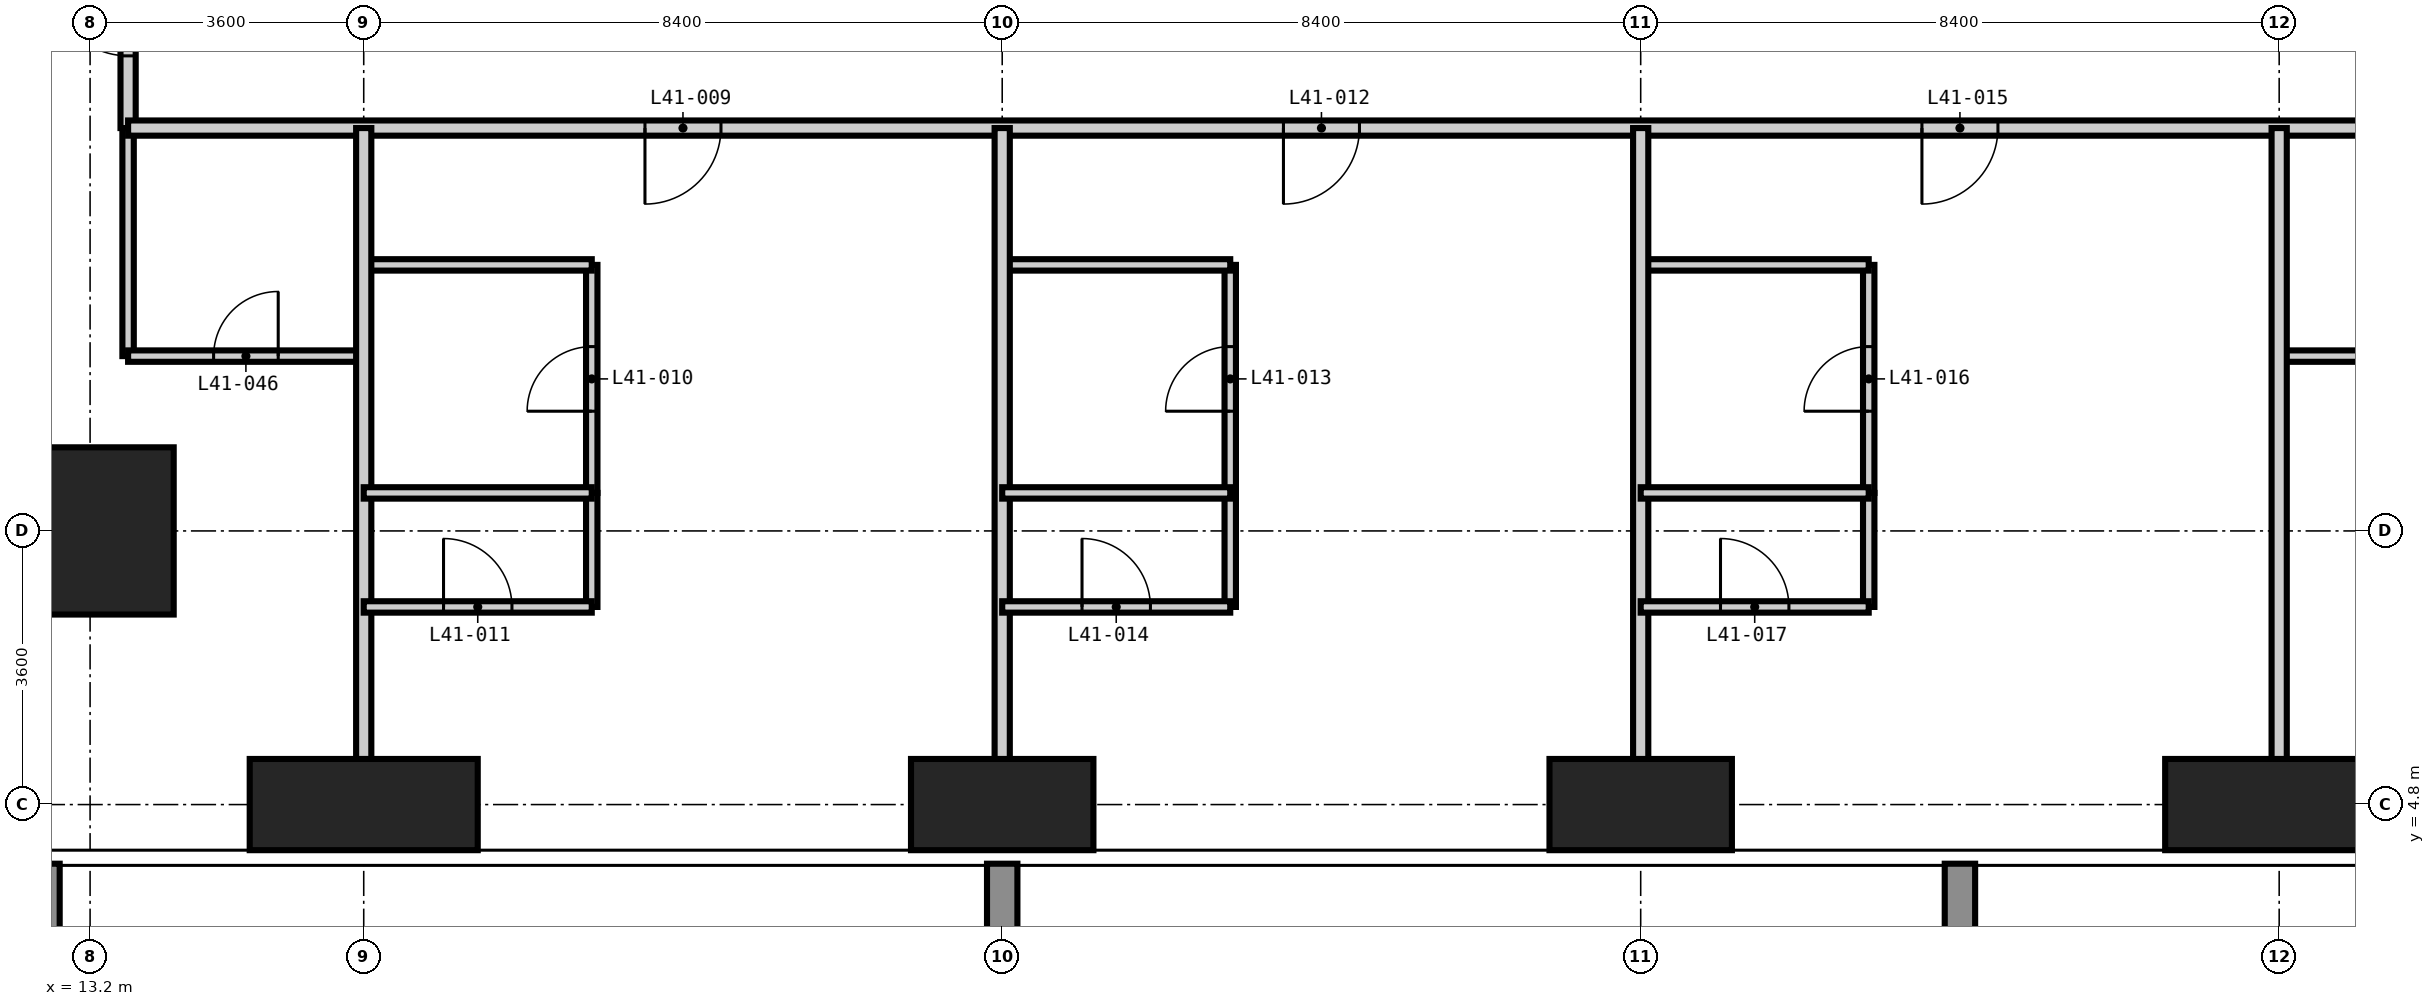
"""IFC4 building model, lengths in metres.
Left out: names, types, materials, properties, quantities, classifications, styles, units other than length and angle.
Written with IfcOpenShell. Run it as: python <this file> out.ifc"""

import sys

from ifc_helpers import new_model, si_unit, direction, frame, frame_2d, origin, origin_2d, place, context, subcontext, project, spatial, rectangle, extrude, element, fill, save


model = new_model("IFC4")
c1 = context("Model", 3, precision=1e-05, world=origin(), true_north=direction((0.0, 1.0)))
c2 = subcontext(c1, "Body", "Model", "MODEL_VIEW")
j1 = project(units=[si_unit("LENGTHUNIT", "METRE"), si_unit("PLANEANGLEUNIT", "RADIAN")], contexts=[c1])
p1 = place(None, origin())
s1 = spatial("IfcSite", under=j1, at=p1, CompositionType="ELEMENT")
p2 = place(p1, origin())
s2 = spatial("IfcBuilding", under=s1, at=p2, CompositionType="ELEMENT")
p3 = place(p2, frame((0.0, 0.0, 162.6)))
s3 = spatial("IfcBuildingStorey", under=s2, at=p3, CompositionType="ELEMENT", Elevation=162.6)
p4 = place(p3, frame((13.2, 8.4, -0.35), z_axis=(0.0, 0.0, 1.0), x_axis=(1.0, 0.0, 0.0)))
e1 = element("IfcColumn", 1, at=p4, inside=s3, PredefinedType="COLUMN", context=c2, shape_type="SweptSolid", body=[
    extrude(rectangle(XDim=2.2, YDim=2.2, at=origin_2d()), origin(), (0.0, 0.0, 1.0), 3.6),
])
p5 = place(p3, frame((16.8, 4.8, -0.35), z_axis=(0.0, 0.0, 1.0), x_axis=(1.0, 0.0, 0.0)))
e2 = element("IfcColumn", 2, at=p5, inside=s3, PredefinedType="COLUMN", context=c2, shape_type="SweptSolid", body=[
    extrude(rectangle(XDim=3.0, YDim=1.2, at=origin_2d()), origin(), (0.0, 0.0, 1.0), 3.6),
])
for number, where, z_axis, x_axis in (
    (3, (25.2, 4.8, -0.35), (0.0, 0.0, 1.0), (1.0, 0.0, 0.0)),
    (4, (33.6, 4.8, -0.35), (0.0, 0.0, 1.0), (1.0, 0.0, 0.0)),
):
    element("IfcColumn", number, at=place(p3, frame(where, z_axis=z_axis, x_axis=x_axis)), inside=s3, PredefinedType="COLUMN", context=c2, shape_type="SweptSolid", body=[
        extrude(rectangle(XDim=2.4, YDim=1.2, at=origin_2d()), origin(), (0.0, 0.0, 1.0), 3.6),
    ])
p6 = place(p3, frame((42.0, 4.8, -0.35), z_axis=(0.0, 0.0, 1.0), x_axis=(1.0, 0.0, 0.0)))
e5 = element("IfcColumn", 5, at=p6, inside=s3, PredefinedType="COLUMN", context=c2, shape_type="SweptSolid", body=[
    extrude(rectangle(XDim=3.0, YDim=1.2, at=origin_2d()), origin(), (0.0, 0.0, 1.0), 3.6),
])
p7 = place(p3, frame((13.7, 10.7, 0.0), z_axis=(0.0, 0.0, 1.0), x_axis=(0.0, 1.0, 0.0)))
e6 = element("IfcWall", 6, at=p7, inside=s3, PredefinedType="PARTITIONING", context=c2, shape_type="SweptSolid", body=[
    extrude(rectangle(XDim=3.0, YDim=0.15, at=frame_2d((1.5, 0.0))), origin(), (0.0, 0.0, 1.0), 3.25),
])
p8 = place(p3, frame((19.8, 8.9, 0.0), z_axis=(0.0, 0.0, 1.0), x_axis=(0.0, 1.0, 0.0)))
e7 = element("IfcWall", 7, at=p8, inside=s3, PredefinedType="PARTITIONING", context=c2, shape_type="SweptSolid", body=[
    extrude(rectangle(XDim=3.0, YDim=0.15, at=frame_2d((1.5, 0.0))), origin(), (0.0, 0.0, 1.0), 3.25),
])
p9 = place(p8, frame((1.075, 0.0, 0.0)))
e8 = element("IfcOpeningElement", 8, at=p9, cuts=e7, PredefinedType="OPENING", context=c2, shape_type="SweptSolid", body=[
    extrude(rectangle(XDim=0.85, YDim=2.1, at=frame_2d((0.425, 1.05))), frame((0.0, 0.085, 0.0), z_axis=(0.0, -1.0, 0.0), x_axis=(1.0, 0.0, 0.0)), (0.0, 0.0, 1.0), 0.17),
])
p10 = place(p3, frame((28.2, 8.9, 0.0), z_axis=(0.0, 0.0, 1.0), x_axis=(0.0, 1.0, 0.0)))
e9 = element("IfcWall", 9, at=p10, inside=s3, PredefinedType="PARTITIONING", context=c2, shape_type="SweptSolid", body=[
    extrude(rectangle(XDim=3.0, YDim=0.15, at=frame_2d((1.5, 0.0))), origin(), (0.0, 0.0, 1.0), 3.25),
])
p11 = place(p10, frame((1.075, 0.0, 0.0)))
e10 = element("IfcOpeningElement", 10, at=p11, cuts=e9, PredefinedType="OPENING", context=c2, shape_type="SweptSolid", body=[
    extrude(rectangle(XDim=0.85, YDim=2.1, at=frame_2d((0.425, 1.05))), frame((0.0, 0.085, 0.0), z_axis=(0.0, -1.0, 0.0), x_axis=(1.0, 0.0, 0.0)), (0.0, 0.0, 1.0), 0.17),
])
p12 = place(p3, frame((36.6, 8.9, 0.0), z_axis=(0.0, 0.0, 1.0), x_axis=(0.0, 1.0, 0.0)))
e11 = element("IfcWall", 11, at=p12, inside=s3, PredefinedType="PARTITIONING", context=c2, shape_type="SweptSolid", body=[
    extrude(rectangle(XDim=3.0, YDim=0.15, at=frame_2d((1.5, 0.0))), origin(), (0.0, 0.0, 1.0), 3.25),
])
p13 = place(p12, frame((1.075, 0.0, 0.0)))
e12 = element("IfcOpeningElement", 12, at=p13, cuts=e11, PredefinedType="OPENING", context=c2, shape_type="SweptSolid", body=[
    extrude(rectangle(XDim=0.85, YDim=2.1, at=frame_2d((0.425, 1.05))), frame((0.0, 0.085, 0.0), z_axis=(0.0, -1.0, 0.0), x_axis=(1.0, 0.0, 0.0)), (0.0, 0.0, 1.0), 0.17),
])
p14 = place(p3, frame((13.7, 10.7, 0.0), z_axis=(0.0, 0.0, 1.0), x_axis=(1.0, 0.0, 0.0)))
e13 = element("IfcWall", 13, at=p14, inside=s3, PredefinedType="PARTITIONING", context=c2, shape_type="SweptSolid", body=[
    extrude(rectangle(XDim=3.1, YDim=0.15, at=frame_2d((1.55, 0.0))), origin(), (0.0, 0.0, 1.0), 3.25),
])
p15 = place(p14, frame((1.125, 0.0, 0.0)))
e14 = element("IfcOpeningElement", 14, at=p15, cuts=e13, PredefinedType="OPENING", context=c2, shape_type="SweptSolid", body=[
    extrude(rectangle(XDim=0.85, YDim=2.1, at=frame_2d((0.425, 1.05))), frame((0.0, 0.085, 0.0), z_axis=(0.0, -1.0, 0.0), x_axis=(1.0, 0.0, 0.0)), (0.0, 0.0, 1.0), 0.17),
])
p16 = place(p3, frame((42.0, 10.7, 0.0), z_axis=(0.0, 0.0, 1.0), x_axis=(1.0, 0.0, 0.0)))
e15 = element("IfcWall", 15, at=p16, inside=s3, PredefinedType="PARTITIONING", context=c2, shape_type="SweptSolid", body=[
    extrude(rectangle(XDim=3.7, YDim=0.15, at=frame_2d((1.85, 0.0))), origin(), (0.0, 0.0, 1.0), 3.25),
])
p17 = place(p16, frame((1.425, 0.0, 0.0)))
e16 = element("IfcOpeningElement", 16, at=p17, cuts=e15, PredefinedType="OPENING", context=c2, shape_type="SweptSolid", body=[
    extrude(rectangle(XDim=0.85, YDim=2.1, at=frame_2d((0.425, 1.05))), frame((0.0, 0.085, 0.0), z_axis=(0.0, -1.0, 0.0), x_axis=(1.0, 0.0, 0.0)), (0.0, 0.0, 1.0), 0.17),
])
for number, where, z_axis, x_axis in (
    (17, (16.8, 11.9, 0.0), (0.0, 0.0, 1.0), (1.0, 0.0, 0.0)),
    (18, (25.2, 11.9, 0.0), (0.0, 0.0, 1.0), (1.0, 0.0, 0.0)),
    (19, (33.6, 11.9, 0.0), (0.0, 0.0, 1.0), (1.0, 0.0, 0.0)),
):
    element("IfcWall", number, at=place(p3, frame(where, z_axis=z_axis, x_axis=x_axis)), inside=s3, PredefinedType="PARTITIONING", context=c2, shape_type="SweptSolid", body=[
        extrude(rectangle(XDim=3.0, YDim=0.15, at=frame_2d((1.5, 0.0))), origin(), (0.0, 0.0, 1.0), 3.25),
    ])
p18 = place(p3, frame((13.7, 13.7, 0.0), z_axis=(0.0, 0.0, 1.0), x_axis=(0.0, 1.0, 0.0)))
e20 = element("IfcWall", 20, at=p18, inside=s3, PredefinedType="PARTITIONING", context=c2, shape_type="SweptSolid", body=[
    extrude(rectangle(XDim=30.8, YDim=0.2, at=frame_2d((15.4, 0.0))), origin(), (0.0, 0.0, 1.0), 3.25),
])
p19 = place(p18, frame((4.7, 0.0, 0.0)))
e21 = element("IfcOpeningElement", 21, at=p19, cuts=e20, PredefinedType="OPENING", context=c2, shape_type="SweptSolid", body=[
    extrude(rectangle(XDim=1.0, YDim=2.2, at=frame_2d((0.5, 1.1))), frame((0.0, 0.11, 0.0), z_axis=(0.0, -1.0, 0.0), x_axis=(1.0, 0.0, 0.0)), (0.0, 0.0, 1.0), 0.22),
])
p20 = place(p18, frame((8.9, 0.0, 0.0)))
e22 = element("IfcOpeningElement", 22, at=p20, cuts=e20, PredefinedType="OPENING", context=c2, shape_type="SweptSolid", body=[
    extrude(rectangle(XDim=1.0, YDim=2.2, at=frame_2d((0.5, 1.1))), frame((0.0, 0.11, 0.0), z_axis=(0.0, -1.0, 0.0), x_axis=(1.0, 0.0, 0.0)), (0.0, 0.0, 1.0), 0.22),
])
p21 = place(p18, frame((13.1, 0.0, 0.0)))
e23 = element("IfcOpeningElement", 23, at=p21, cuts=e20, PredefinedType="OPENING", context=c2, shape_type="SweptSolid", body=[
    extrude(rectangle(XDim=1.0, YDim=2.2, at=frame_2d((0.5, 1.1))), frame((0.0, 0.11, 0.0), z_axis=(0.0, -1.0, 0.0), x_axis=(1.0, 0.0, 0.0)), (0.0, 0.0, 1.0), 0.22),
])
p22 = place(p18, frame((17.3, 0.0, 0.0)))
e24 = element("IfcOpeningElement", 24, at=p22, cuts=e20, PredefinedType="OPENING", context=c2, shape_type="SweptSolid", body=[
    extrude(rectangle(XDim=1.0, YDim=2.2, at=frame_2d((0.5, 1.1))), frame((0.0, 0.11, 0.0), z_axis=(0.0, -1.0, 0.0), x_axis=(1.0, 0.0, 0.0)), (0.0, 0.0, 1.0), 0.22),
])
p23 = place(p18, frame((21.5, 0.0, 0.0)))
e25 = element("IfcOpeningElement", 25, at=p23, cuts=e20, PredefinedType="OPENING", context=c2, shape_type="SweptSolid", body=[
    extrude(rectangle(XDim=1.0, YDim=2.2, at=frame_2d((0.5, 1.1))), frame((0.0, 0.11, 0.0), z_axis=(0.0, -1.0, 0.0), x_axis=(1.0, 0.0, 0.0)), (0.0, 0.0, 1.0), 0.22),
])
p24 = place(p18, frame((25.7, 0.0, 0.0)))
e26 = element("IfcOpeningElement", 26, at=p24, cuts=e20, PredefinedType="OPENING", context=c2, shape_type="SweptSolid", body=[
    extrude(rectangle(XDim=1.0, YDim=2.2, at=frame_2d((0.5, 1.1))), frame((0.0, 0.11, 0.0), z_axis=(0.0, -1.0, 0.0), x_axis=(1.0, 0.0, 0.0)), (0.0, 0.0, 1.0), 0.22),
])
p25 = place(p18, frame((0.95, 0.0, 0.0)))
e27 = element("IfcOpeningElement", 27, at=p25, cuts=e20, PredefinedType="OPENING", context=c2, shape_type="SweptSolid", body=[
    extrude(rectangle(XDim=1.0, YDim=2.2, at=frame_2d((0.5, 1.1))), frame((0.0, 0.11, 0.0), z_axis=(0.0, -1.0, 0.0), x_axis=(1.0, 0.0, 0.0)), (0.0, 0.0, 1.0), 0.22),
])
p26 = place(p18, frame((29.45, 0.0, 0.0)))
e28 = element("IfcOpeningElement", 28, at=p26, cuts=e20, PredefinedType="OPENING", context=c2, shape_type="SweptSolid", body=[
    extrude(rectangle(XDim=1.0, YDim=2.2, at=frame_2d((0.5, 1.1))), frame((0.0, 0.11, 0.0), z_axis=(0.0, -1.0, 0.0), x_axis=(1.0, 0.0, 0.0)), (0.0, 0.0, 1.0), 0.22),
])
p27 = place(p3, frame((45.7, 13.7, 0.0), z_axis=(0.0, 0.0, 1.0), x_axis=(-1.0, 0.0, 0.0)))
e29 = element("IfcWall", 29, at=p27, inside=s3, PredefinedType="PARTITIONING", context=c2, shape_type="SweptSolid", body=[
    extrude(rectangle(XDim=32.0, YDim=0.2, at=frame_2d((16.0, 0.0))), origin(), (0.0, 0.0, 1.0), 3.25),
])
p28 = place(p27, frame((24.2, 0.0, 0.0)))
e30 = element("IfcOpeningElement", 30, at=p28, cuts=e29, PredefinedType="OPENING", context=c2, shape_type="SweptSolid", body=[
    extrude(rectangle(XDim=1.0, YDim=2.2, at=frame_2d((0.5, 1.1))), frame((0.0, 0.11, 0.0), z_axis=(0.0, -1.0, 0.0), x_axis=(1.0, 0.0, 0.0)), (0.0, 0.0, 1.0), 0.22),
])
p29 = place(p27, frame((15.8, 0.0, 0.0)))
e31 = element("IfcOpeningElement", 31, at=p29, cuts=e29, PredefinedType="OPENING", context=c2, shape_type="SweptSolid", body=[
    extrude(rectangle(XDim=1.0, YDim=2.2, at=frame_2d((0.5, 1.1))), frame((0.0, 0.11, 0.0), z_axis=(0.0, -1.0, 0.0), x_axis=(1.0, 0.0, 0.0)), (0.0, 0.0, 1.0), 0.22),
])
p30 = place(p27, frame((7.4, 0.0, 0.0)))
e32 = element("IfcOpeningElement", 32, at=p30, cuts=e29, PredefinedType="OPENING", context=c2, shape_type="SweptSolid", body=[
    extrude(rectangle(XDim=1.0, YDim=2.2, at=frame_2d((0.5, 1.1))), frame((0.0, 0.11, 0.0), z_axis=(0.0, -1.0, 0.0), x_axis=(1.0, 0.0, 0.0)), (0.0, 0.0, 1.0), 0.22),
])
for number, where, z_axis, x_axis in (
    (33, (16.8, 4.182, 0.0), (0.0, 0.0, 1.0), (0.0, 1.0, 0.0)),
    (34, (25.2, 4.182, 0.0), (0.0, 0.0, 1.0), (0.0, 1.0, 0.0)),
    (35, (33.6, 4.182, 0.0), (0.0, 0.0, 1.0), (0.0, 1.0, 0.0)),
    (36, (42.0, 4.182, 0.0), (0.0, 0.0, 1.0), (0.0, 1.0, 0.0)),
):
    element("IfcWall", number, at=place(p3, frame(where, z_axis=z_axis, x_axis=x_axis)), inside=s3, PredefinedType="PARTITIONING", context=c2, shape_type="SweptSolid", body=[
        extrude(rectangle(XDim=9.518, YDim=0.2, at=frame_2d((4.759, 0.0))), origin(), (0.0, 0.0, 1.0), 3.25),
    ])
for number, where, z_axis, x_axis in (
    (37, (19.8, 7.4, 0.0), (0.0, 0.0, 1.0), (0.0, 1.0, 0.0)),
    (38, (28.2, 7.4, 0.0), (0.0, 0.0, 1.0), (0.0, 1.0, 0.0)),
    (39, (36.6, 7.4, 0.0), (0.0, 0.0, 1.0), (0.0, 1.0, 0.0)),
):
    element("IfcWall", number, at=place(p3, frame(where, z_axis=z_axis, x_axis=x_axis)), inside=s3, PredefinedType="PARTITIONING", context=c2, shape_type="SweptSolid", body=[
        extrude(rectangle(XDim=1.5, YDim=0.15, at=frame_2d((0.75, 0.0))), origin(), (0.0, 0.0, 1.0), 3.25),
    ])
p31 = place(p3, frame((16.8, 7.4, 0.0), z_axis=(0.0, 0.0, 1.0), x_axis=(1.0, 0.0, 0.0)))
e40 = element("IfcWall", 40, at=p31, inside=s3, PredefinedType="PARTITIONING", context=c2, shape_type="SweptSolid", body=[
    extrude(rectangle(XDim=3.0, YDim=0.15, at=frame_2d((1.5, 0.0))), origin(), (0.0, 0.0, 1.0), 3.25),
])
p32 = place(p31, frame((1.05, 0.0, 0.0)))
e41 = element("IfcOpeningElement", 41, at=p32, cuts=e40, PredefinedType="OPENING", context=c2, shape_type="SweptSolid", body=[
    extrude(rectangle(XDim=0.9, YDim=2.1, at=frame_2d((0.45, 1.05))), frame((0.0, 0.085, 0.0), z_axis=(0.0, -1.0, 0.0), x_axis=(1.0, 0.0, 0.0)), (0.0, 0.0, 1.0), 0.17),
])
p33 = place(p3, frame((25.2, 7.4, 0.0), z_axis=(0.0, 0.0, 1.0), x_axis=(1.0, 0.0, 0.0)))
e42 = element("IfcWall", 42, at=p33, inside=s3, PredefinedType="PARTITIONING", context=c2, shape_type="SweptSolid", body=[
    extrude(rectangle(XDim=3.0, YDim=0.15, at=frame_2d((1.5, 0.0))), origin(), (0.0, 0.0, 1.0), 3.25),
])
p34 = place(p33, frame((1.05, 0.0, 0.0)))
e43 = element("IfcOpeningElement", 43, at=p34, cuts=e42, PredefinedType="OPENING", context=c2, shape_type="SweptSolid", body=[
    extrude(rectangle(XDim=0.9, YDim=2.1, at=frame_2d((0.45, 1.05))), frame((0.0, 0.085, 0.0), z_axis=(0.0, -1.0, 0.0), x_axis=(1.0, 0.0, 0.0)), (0.0, 0.0, 1.0), 0.17),
])
p35 = place(p3, frame((33.6, 7.4, 0.0), z_axis=(0.0, 0.0, 1.0), x_axis=(1.0, 0.0, 0.0)))
e44 = element("IfcWall", 44, at=p35, inside=s3, PredefinedType="PARTITIONING", context=c2, shape_type="SweptSolid", body=[
    extrude(rectangle(XDim=3.0, YDim=0.15, at=frame_2d((1.5, 0.0))), origin(), (0.0, 0.0, 1.0), 3.25),
])
p36 = place(p35, frame((1.05, 0.0, 0.0)))
e45 = element("IfcOpeningElement", 45, at=p36, cuts=e44, PredefinedType="OPENING", context=c2, shape_type="SweptSolid", body=[
    extrude(rectangle(XDim=0.9, YDim=2.1, at=frame_2d((0.45, 1.05))), frame((0.0, 0.085, 0.0), z_axis=(0.0, -1.0, 0.0), x_axis=(1.0, 0.0, 0.0)), (0.0, 0.0, 1.0), 0.17),
])
for number, where, z_axis, x_axis in (
    (46, (16.8, 8.9, 0.0), (0.0, 0.0, 1.0), (1.0, 0.0, 0.0)),
    (47, (25.2, 8.9, 0.0), (0.0, 0.0, 1.0), (1.0, 0.0, 0.0)),
    (48, (33.6, 8.9, 0.0), (0.0, 0.0, 1.0), (1.0, 0.0, 0.0)),
):
    element("IfcWall", number, at=place(p3, frame(where, z_axis=z_axis, x_axis=x_axis)), inside=s3, PredefinedType="PARTITIONING", context=c2, shape_type="SweptSolid", body=[
        extrude(rectangle(XDim=3.0, YDim=0.15, at=frame_2d((1.5, 0.0))), origin(), (0.0, 0.0, 1.0), 3.25),
    ])
p37 = place(p28, origin())
e49 = element("IfcDoor", 49, at=p37, inside=s3, OperationType="SINGLE_SWING_RIGHT", PredefinedType="DOOR", context=c2, shape_type="SweptSolid", body=[
    extrude(rectangle(XDim=1.0, YDim=2.2, at=frame_2d((0.5, 1.1))), frame((0.0, 0.025, 0.0), z_axis=(0.0, -1.0, 0.0), x_axis=(1.0, 0.0, 0.0)), (0.0, 0.0, 1.0), 0.05),
])
fill(e30, e49)
p38 = place(p9, origin())
e50 = element("IfcDoor", 50, at=p38, inside=s3, OperationType="SINGLE_SWING_LEFT", PredefinedType="DOOR", context=c2, shape_type="SweptSolid", body=[
    extrude(rectangle(XDim=0.85, YDim=2.1, at=frame_2d((0.425, 1.05))), frame((0.0, 0.025, 0.0), z_axis=(0.0, -1.0, 0.0), x_axis=(1.0, 0.0, 0.0)), (0.0, 0.0, 1.0), 0.05),
])
fill(e8, e50)
p39 = place(p32, origin())
e51 = element("IfcDoor", 51, at=p39, inside=s3, OperationType="SINGLE_SWING_LEFT", PredefinedType="DOOR", context=c2, shape_type="SweptSolid", body=[
    extrude(rectangle(XDim=0.9, YDim=2.1, at=frame_2d((0.45, 1.05))), frame((0.0, 0.025, 0.0), z_axis=(0.0, -1.0, 0.0), x_axis=(1.0, 0.0, 0.0)), (0.0, 0.0, 1.0), 0.05),
])
fill(e41, e51)
p40 = place(p29, origin())
e52 = element("IfcDoor", 52, at=p40, inside=s3, OperationType="SINGLE_SWING_RIGHT", PredefinedType="DOOR", context=c2, shape_type="SweptSolid", body=[
    extrude(rectangle(XDim=1.0, YDim=2.2, at=frame_2d((0.5, 1.1))), frame((0.0, 0.025, 0.0), z_axis=(0.0, -1.0, 0.0), x_axis=(1.0, 0.0, 0.0)), (0.0, 0.0, 1.0), 0.05),
])
fill(e31, e52)
p41 = place(p11, origin())
e53 = element("IfcDoor", 53, at=p41, inside=s3, OperationType="SINGLE_SWING_LEFT", PredefinedType="DOOR", context=c2, shape_type="SweptSolid", body=[
    extrude(rectangle(XDim=0.85, YDim=2.1, at=frame_2d((0.425, 1.05))), frame((0.0, 0.025, 0.0), z_axis=(0.0, -1.0, 0.0), x_axis=(1.0, 0.0, 0.0)), (0.0, 0.0, 1.0), 0.05),
])
fill(e10, e53)
p42 = place(p34, origin())
e54 = element("IfcDoor", 54, at=p42, inside=s3, OperationType="SINGLE_SWING_LEFT", PredefinedType="DOOR", context=c2, shape_type="SweptSolid", body=[
    extrude(rectangle(XDim=0.9, YDim=2.1, at=frame_2d((0.45, 1.05))), frame((0.0, 0.025, 0.0), z_axis=(0.0, -1.0, 0.0), x_axis=(1.0, 0.0, 0.0)), (0.0, 0.0, 1.0), 0.05),
])
fill(e43, e54)
p43 = place(p30, origin())
e55 = element("IfcDoor", 55, at=p43, inside=s3, OperationType="SINGLE_SWING_RIGHT", PredefinedType="DOOR", context=c2, shape_type="SweptSolid", body=[
    extrude(rectangle(XDim=1.0, YDim=2.2, at=frame_2d((0.5, 1.1))), frame((0.0, 0.025, 0.0), z_axis=(0.0, -1.0, 0.0), x_axis=(1.0, 0.0, 0.0)), (0.0, 0.0, 1.0), 0.05),
])
fill(e32, e55)
p44 = place(p13, origin())
e56 = element("IfcDoor", 56, at=p44, inside=s3, OperationType="SINGLE_SWING_LEFT", PredefinedType="DOOR", context=c2, shape_type="SweptSolid", body=[
    extrude(rectangle(XDim=0.85, YDim=2.1, at=frame_2d((0.425, 1.05))), frame((0.0, 0.025, 0.0), z_axis=(0.0, -1.0, 0.0), x_axis=(1.0, 0.0, 0.0)), (0.0, 0.0, 1.0), 0.05),
])
fill(e12, e56)
p45 = place(p36, origin())
e57 = element("IfcDoor", 57, at=p45, inside=s3, OperationType="SINGLE_SWING_LEFT", PredefinedType="DOOR", context=c2, shape_type="SweptSolid", body=[
    extrude(rectangle(XDim=0.9, YDim=2.1, at=frame_2d((0.45, 1.05))), frame((0.0, 0.025, 0.0), z_axis=(0.0, -1.0, 0.0), x_axis=(1.0, 0.0, 0.0)), (0.0, 0.0, 1.0), 0.05),
])
fill(e45, e57)
p46 = place(p25, origin())
e58 = element("IfcDoor", 58, at=p46, inside=s3, OperationType="SINGLE_SWING_RIGHT", PredefinedType="DOOR", context=c2, shape_type="SweptSolid", body=[
    extrude(rectangle(XDim=1.0, YDim=2.2, at=frame_2d((0.5, 1.1))), frame((0.0, 0.025, 0.0), z_axis=(0.0, -1.0, 0.0), x_axis=(1.0, 0.0, 0.0)), (0.0, 0.0, 1.0), 0.05),
])
fill(e27, e58)
p47 = place(p15, origin())
e59 = element("IfcDoor", 59, at=p47, inside=s3, OperationType="SINGLE_SWING_RIGHT", PredefinedType="DOOR", context=c2, shape_type="SweptSolid", body=[
    extrude(rectangle(XDim=0.85, YDim=2.1, at=frame_2d((0.425, 1.05))), frame((0.0, 0.025, 0.0), z_axis=(0.0, -1.0, 0.0), x_axis=(1.0, 0.0, 0.0)), (0.0, 0.0, 1.0), 0.05),
])
fill(e14, e59)
save(model, sys.argv[1])
